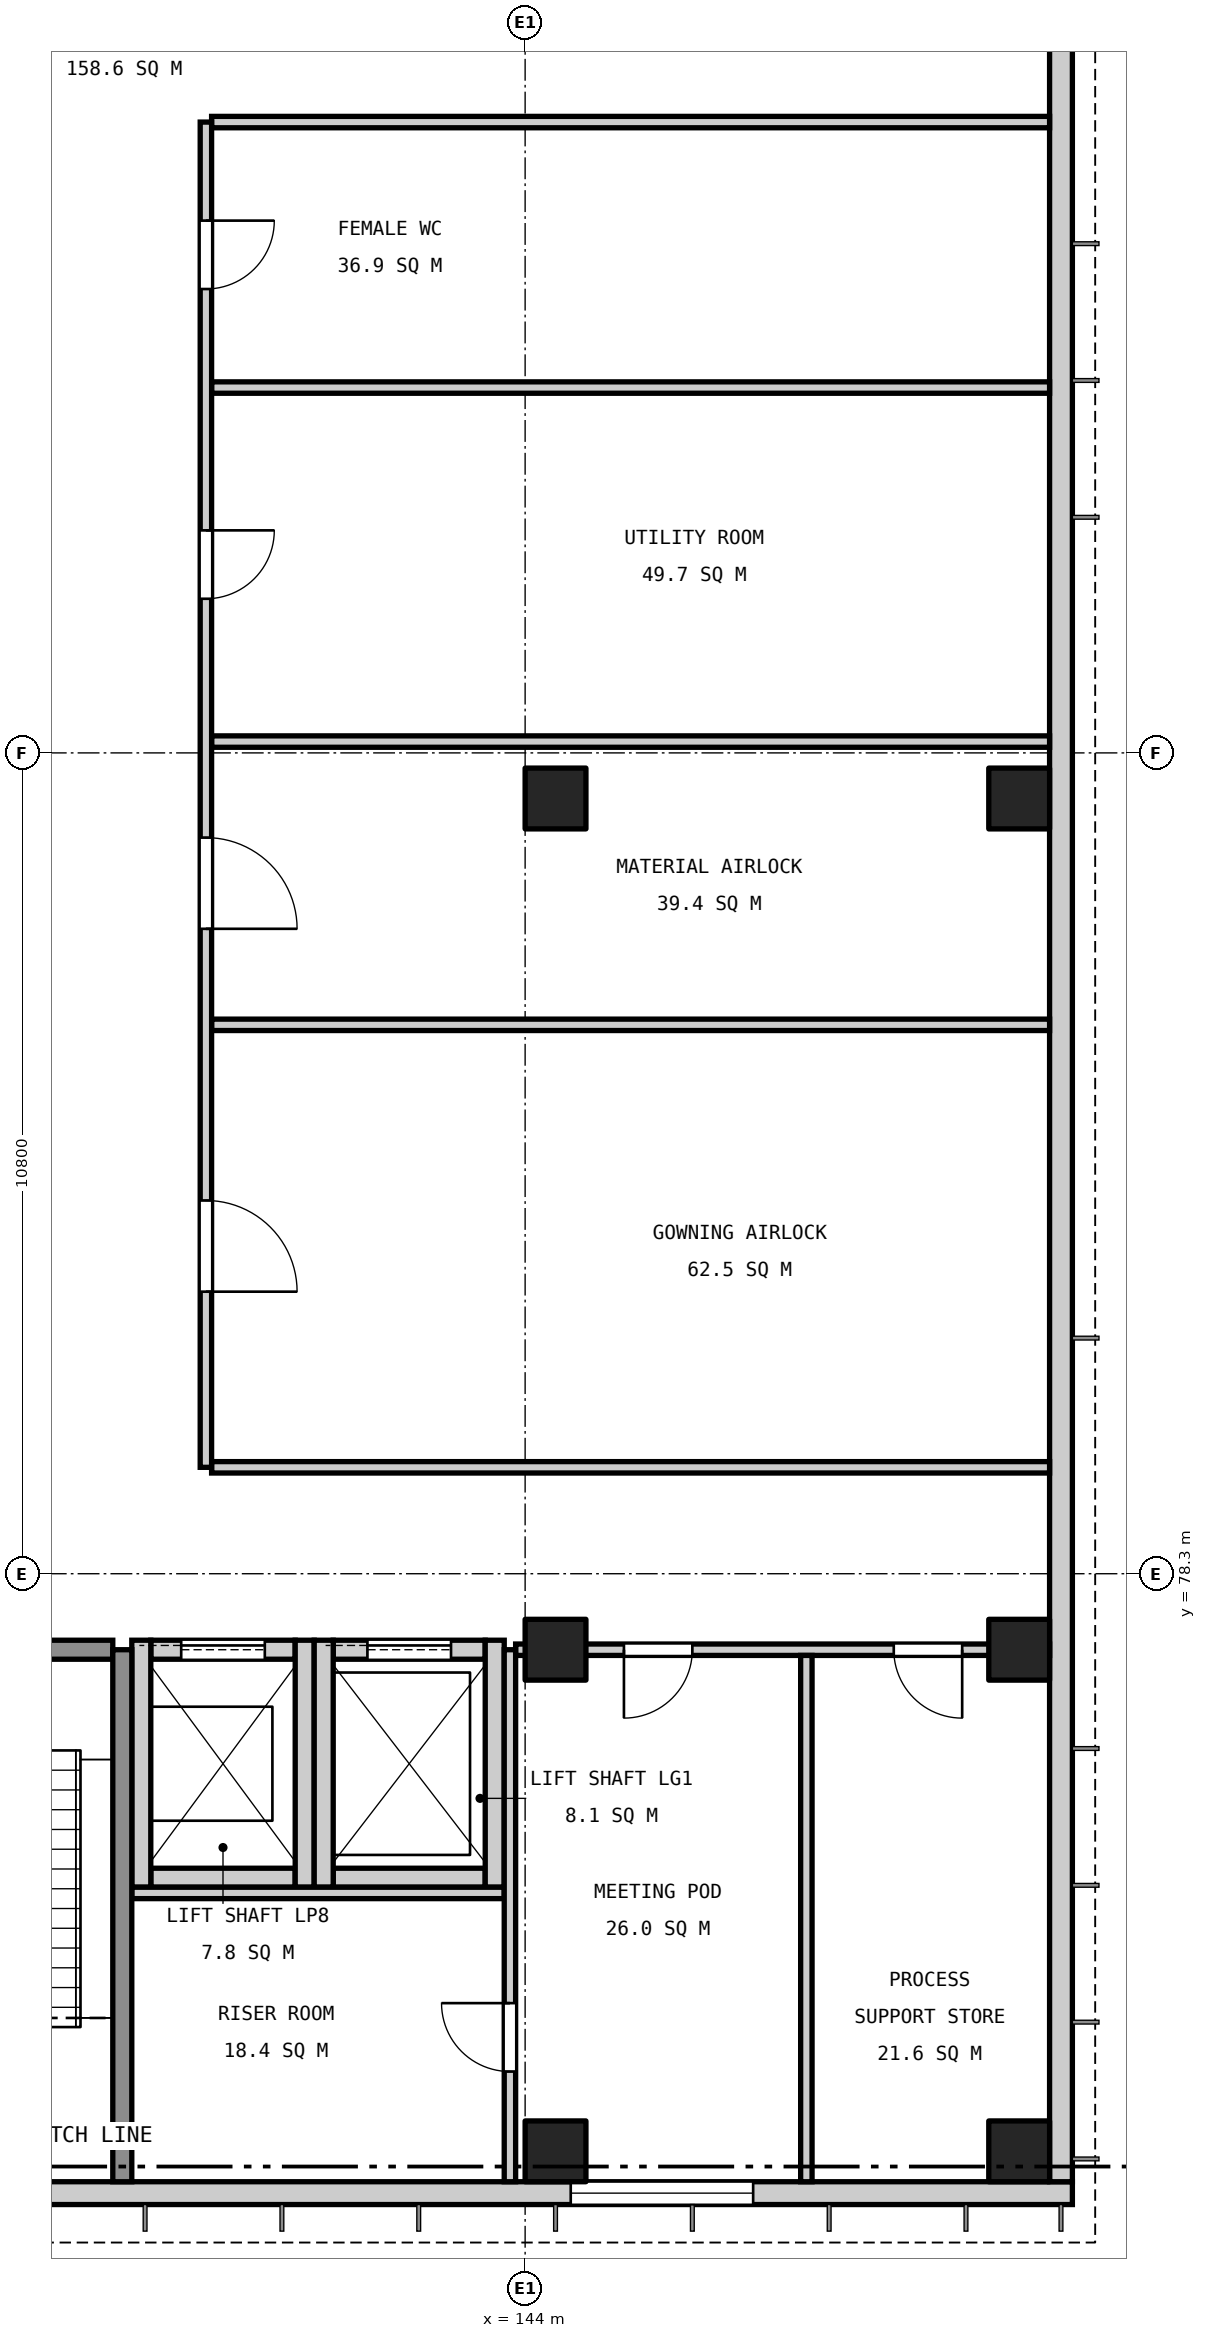
"""IFC4 building model, lengths in metres.
Left out: names, types, materials, properties, quantities, classifications, styles, units other than length and angle.
Written with IfcOpenShell. Run it as: python <this file> out.ifc"""

import sys

from ifc_helpers import new_model, si_unit, direction, frame, frame_2d, origin, origin_2d, place, context, subcontext, project, spatial, rectangle, extrude, element, fill, save


model = new_model("IFC4")
c1 = context("Model", 3, precision=1e-05, world=origin(), true_north=direction((0.0, 1.0)))
c2 = subcontext(c1, "Body", "Model", "MODEL_VIEW")
j1 = project(units=[si_unit("LENGTHUNIT", "METRE"), si_unit("PLANEANGLEUNIT", "RADIAN")], contexts=[c1])
p1 = place(None, origin())
s1 = spatial("IfcSite", under=j1, at=p1, CompositionType="ELEMENT")
p2 = place(p1, origin())
s2 = spatial("IfcBuilding", under=s1, at=p2, CompositionType="ELEMENT")
p3 = place(p2, frame((0.0, 0.0, 6.0)))
s3 = spatial("IfcBuildingStorey", under=s2, at=p3, CompositionType="ELEMENT", Elevation=6.0)
p4 = place(p3, frame((139.075, 74.3, 0.0), z_axis=(0.0, 0.0, 1.0), x_axis=(1.0, 0.0, 0.0)))
e1 = element("IfcWall", 1, at=p4, inside=s3, PredefinedType="SOLIDWALL", context=c2, shape_type="SweptSolid", body=[
    extrude(rectangle(XDim=1.9, YDim=0.25, at=frame_2d((0.95, 0.0))), origin(), (0.0, 0.0, 1.0), 4.95),
])
p5 = place(p3, frame((139.075, 77.3, 0.0), z_axis=(0.0, 0.0, 1.0), x_axis=(1.0, 0.0, 0.0)))
e2 = element("IfcWall", 2, at=p5, inside=s3, PredefinedType="SOLIDWALL", context=c2, shape_type="SweptSolid", body=[
    extrude(rectangle(XDim=1.9, YDim=0.25, at=frame_2d((0.95, 0.0))), origin(), (0.0, 0.0, 1.0), 4.95),
])
p6 = place(p5, frame((0.4, 0.0, 0.0)))
e3 = element("IfcOpeningElement", 3, at=p6, cuts=e2, PredefinedType="OPENING", context=c2, shape_type="SweptSolid", body=[
    extrude(rectangle(XDim=1.1, YDim=2.1, at=frame_2d((0.55, 1.05))), frame((0.0, 0.135, 0.0), z_axis=(0.0, -1.0, 0.0), x_axis=(1.0, 0.0, 0.0)), (0.0, 0.0, 1.0), 0.27),
])
for number, where, z_axis, x_axis in (
    (4, (138.95, 74.175, 0.0), (0.0, 0.0, 1.0), (0.0, 1.0, 0.0)),
    (5, (141.1, 74.175, 0.0), (0.0, 0.0, 1.0), (0.0, 1.0, 0.0)),
):
    element("IfcWall", number, at=place(p3, frame(where, z_axis=z_axis, x_axis=x_axis)), inside=s3, PredefinedType="SOLIDWALL", context=c2, shape_type="SweptSolid", body=[
        extrude(rectangle(XDim=3.25, YDim=0.25, at=frame_2d((1.625, 0.0))), origin(), (0.0, 0.0, 1.0), 4.95),
    ])
p7 = place(p3, frame((141.475, 74.3, 0.0), z_axis=(0.0, 0.0, 1.0), x_axis=(1.0, 0.0, 0.0)))
e6 = element("IfcWall", 6, at=p7, inside=s3, PredefinedType="SOLIDWALL", context=c2, shape_type="SweptSolid", body=[
    extrude(rectangle(XDim=2.0, YDim=0.25, at=frame_2d((1.0, 0.0))), origin(), (0.0, 0.0, 1.0), 4.95),
])
p8 = place(p3, frame((141.475, 77.3, 0.0), z_axis=(0.0, 0.0, 1.0), x_axis=(1.0, 0.0, 0.0)))
e7 = element("IfcWall", 7, at=p8, inside=s3, PredefinedType="SOLIDWALL", context=c2, shape_type="SweptSolid", body=[
    extrude(rectangle(XDim=2.0, YDim=0.25, at=frame_2d((1.0, 0.0))), origin(), (0.0, 0.0, 1.0), 4.95),
])
p9 = place(p8, frame((0.45, 0.0, 0.0)))
e8 = element("IfcOpeningElement", 8, at=p9, cuts=e7, PredefinedType="OPENING", context=c2, shape_type="SweptSolid", body=[
    extrude(rectangle(XDim=1.1, YDim=2.1, at=frame_2d((0.55, 1.05))), frame((0.0, 0.135, 0.0), z_axis=(0.0, -1.0, 0.0), x_axis=(1.0, 0.0, 0.0)), (0.0, 0.0, 1.0), 0.27),
])
for number, where, z_axis, x_axis in (
    (9, (141.35, 74.175, 0.0), (0.0, 0.0, 1.0), (0.0, 1.0, 0.0)),
    (10, (143.6, 74.175, 0.0), (0.0, 0.0, 1.0), (0.0, 1.0, 0.0)),
):
    element("IfcWall", number, at=place(p3, frame(where, z_axis=z_axis, x_axis=x_axis)), inside=s3, PredefinedType="SOLIDWALL", context=c2, shape_type="SweptSolid", body=[
        extrude(rectangle(XDim=3.25, YDim=0.25, at=frame_2d((1.625, 0.0))), origin(), (0.0, 0.0, 1.0), 4.95),
    ])
for number, where, z_axis, x_axis in (
    (11, (144.4, 70.7, 0.0), (0.0, 0.0, 1.0), (1.0, 0.0, 0.0)),
    (12, (144.4, 77.3, 0.0), (0.0, 0.0, 1.0), (1.0, 0.0, 0.0)),
    (13, (144.4, 88.5, 0.0), (0.0, 0.0, 1.0), (1.0, 0.0, 0.0)),
    (14, (150.5, 70.7, 0.0), (0.0, 0.0, 1.0), (1.0, 0.0, 0.0)),
    (15, (150.5, 77.3, 0.0), (0.0, 0.0, 1.0), (1.0, 0.0, 0.0)),
    (16, (150.5, 88.5, 0.0), (0.0, 0.0, 1.0), (1.0, 0.0, 0.0)),
):
    element("IfcColumn", number, at=place(p3, frame(where, z_axis=z_axis, x_axis=x_axis)), inside=s3, PredefinedType="COLUMN", context=c2, shape_type="SweptSolid", body=[
        extrude(rectangle(XDim=0.8, YDim=0.8, at=origin_2d()), origin(), (0.0, 0.0, 1.0), 5.4),
    ])
p10 = place(p3, frame((124.0, 70.15, 0.0), z_axis=(0.0, 0.0, 1.0), x_axis=(1.0, 0.0, 0.0)))
e17 = element("IfcWall", 17, at=p10, inside=s3, PredefinedType="SOLIDWALL", context=c2, shape_type="SweptSolid", body=[
    extrude(rectangle(XDim=27.2, YDim=0.3, at=frame_2d((13.6, 0.0))), origin(), (0.0, 0.0, 1.0), 4.95),
])
p11 = place(p10, frame((2.1, 0.0, 0.9)))
e18 = element("IfcOpeningElement", 18, at=p11, cuts=e17, PredefinedType="OPENING", context=c2, shape_type="SweptSolid", body=[
    extrude(rectangle(XDim=2.4, YDim=1.8, at=frame_2d((1.2, 0.9))), frame((0.0, 0.16, 0.0), z_axis=(0.0, -1.0, 0.0), x_axis=(1.0, 0.0, 0.0)), (0.0, 0.0, 1.0), 0.32),
])
p12 = place(p10, frame((6.9, 0.0, 0.9)))
e19 = element("IfcOpeningElement", 19, at=p12, cuts=e17, PredefinedType="OPENING", context=c2, shape_type="SweptSolid", body=[
    extrude(rectangle(XDim=2.4, YDim=1.8, at=frame_2d((1.2, 0.9))), frame((0.0, 0.16, 0.0), z_axis=(0.0, -1.0, 0.0), x_axis=(1.0, 0.0, 0.0)), (0.0, 0.0, 1.0), 0.32),
])
p13 = place(p10, frame((20.6, 0.0, 0.9)))
e20 = element("IfcOpeningElement", 20, at=p13, cuts=e17, PredefinedType="OPENING", context=c2, shape_type="SweptSolid", body=[
    extrude(rectangle(XDim=2.4, YDim=1.8, at=frame_2d((1.2, 0.9))), frame((0.0, 0.16, 0.0), z_axis=(0.0, -1.0, 0.0), x_axis=(1.0, 0.0, 0.0)), (0.0, 0.0, 1.0), 0.32),
])
p14 = place(p3, frame((151.05, 70.3, 0.0), z_axis=(0.0, 0.0, 1.0), x_axis=(0.0, 1.0, 0.0)))
e21 = element("IfcWall", 21, at=p14, inside=s3, PredefinedType="SOLIDWALL", context=c2, shape_type="SweptSolid", body=[
    extrude(rectangle(XDim=36.5, YDim=0.3, at=frame_2d((18.25, 0.0))), origin(), (0.0, 0.0, 1.0), 4.95),
])
p15 = place(p3, frame((138.825, 74.1, 0.0), z_axis=(0.0, 0.0, 1.0), x_axis=(1.0, 0.0, 0.0)))
e22 = element("IfcWall", 22, at=p15, inside=s3, PredefinedType="SOLIDWALL", context=c2, shape_type="SweptSolid", body=[
    extrude(rectangle(XDim=4.9, YDim=0.15, at=frame_2d((2.45, 0.0))), origin(), (0.0, 0.0, 1.0), 4.95),
])
p16 = place(p3, frame((124.3, 77.3, 0.0), z_axis=(0.0, 0.0, 1.0), x_axis=(1.0, 0.0, 0.0)))
e23 = element("IfcWall", 23, at=p16, inside=s3, PredefinedType="SOLIDWALL", context=c2, shape_type="SweptSolid", body=[
    extrude(rectangle(XDim=14.275, YDim=0.25, at=frame_2d((7.137, 0.0))), origin(), (0.0, 0.0, 1.0), 4.95),
])
p17 = place(p16, frame((2.4, 0.0, 0.0)))
e24 = element("IfcOpeningElement", 24, at=p17, cuts=e23, PredefinedType="OPENING", context=c2, shape_type="SweptSolid", body=[
    extrude(rectangle(XDim=1.2, YDim=2.1, at=frame_2d((0.6, 1.05))), frame((0.0, 0.135, 0.0), z_axis=(0.0, -1.0, 0.0), x_axis=(1.0, 0.0, 0.0)), (0.0, 0.0, 1.0), 0.27),
])
p18 = place(p16, frame((7.6, 0.0, 0.0)))
e25 = element("IfcOpeningElement", 25, at=p18, cuts=e23, PredefinedType="OPENING", context=c2, shape_type="SweptSolid", body=[
    extrude(rectangle(XDim=0.9, YDim=2.1, at=frame_2d((0.45, 1.05))), frame((0.0, 0.135, 0.0), z_axis=(0.0, -1.0, 0.0), x_axis=(1.0, 0.0, 0.0)), (0.0, 0.0, 1.0), 0.27),
])
p19 = place(p16, frame((11.65, 0.0, 0.0)))
e26 = element("IfcOpeningElement", 26, at=p19, cuts=e23, PredefinedType="OPENING", context=c2, shape_type="SweptSolid", body=[
    extrude(rectangle(XDim=1.2, YDim=2.1, at=frame_2d((0.6, 1.05))), frame((0.0, 0.135, 0.0), z_axis=(0.0, -1.0, 0.0), x_axis=(1.0, 0.0, 0.0)), (0.0, 0.0, 1.0), 0.27),
])
p20 = place(p3, frame((143.875, 77.3, 0.0), z_axis=(0.0, 0.0, 1.0), x_axis=(1.0, 0.0, 0.0)))
e27 = element("IfcWall", 27, at=p20, inside=s3, PredefinedType="SOLIDWALL", context=c2, shape_type="SweptSolid", body=[
    extrude(rectangle(XDim=7.025, YDim=0.15, at=frame_2d((3.512, 0.0))), origin(), (0.0, 0.0, 1.0), 4.95),
])
p21 = place(p20, frame((1.425, 0.0, 0.0)))
e28 = element("IfcOpeningElement", 28, at=p21, cuts=e27, PredefinedType="OPENING", context=c2, shape_type="SweptSolid", body=[
    extrude(rectangle(XDim=0.9, YDim=2.1, at=frame_2d((0.45, 1.05))), frame((0.0, 0.085, 0.0), z_axis=(0.0, -1.0, 0.0), x_axis=(1.0, 0.0, 0.0)), (0.0, 0.0, 1.0), 0.17),
])
p22 = place(p20, frame((4.975, 0.0, 0.0)))
e29 = element("IfcOpeningElement", 29, at=p22, cuts=e27, PredefinedType="OPENING", context=c2, shape_type="SweptSolid", body=[
    extrude(rectangle(XDim=0.9, YDim=2.1, at=frame_2d((0.45, 1.05))), frame((0.0, 0.085, 0.0), z_axis=(0.0, -1.0, 0.0), x_axis=(1.0, 0.0, 0.0)), (0.0, 0.0, 1.0), 0.17),
])
for number, where, z_axis, x_axis in (
    (30, (139.875, 79.7, 0.0), (0.0, 0.0, 1.0), (1.0, 0.0, 0.0)),
    (31, (139.875, 85.522, 0.0), (0.0, 0.0, 1.0), (1.0, 0.0, 0.0)),
    (32, (139.875, 89.249, 0.0), (0.0, 0.0, 1.0), (1.0, 0.0, 0.0)),
    (33, (139.875, 93.907, 0.0), (0.0, 0.0, 1.0), (1.0, 0.0, 0.0)),
    (34, (139.875, 97.4, 0.0), (0.0, 0.0, 1.0), (1.0, 0.0, 0.0)),
):
    element("IfcWall", number, at=place(p3, frame(where, z_axis=z_axis, x_axis=x_axis)), inside=s3, PredefinedType="SOLIDWALL", context=c2, shape_type="SweptSolid", body=[
        extrude(rectangle(XDim=11.025, YDim=0.15, at=frame_2d((5.512, 0.0))), origin(), (0.0, 0.0, 1.0), 4.95),
    ])
p23 = place(p3, frame((138.7, 70.3, 0.0), z_axis=(0.0, 0.0, 1.0), x_axis=(0.0, 1.0, 0.0)))
e35 = element("IfcWall", 35, at=p23, inside=s3, PredefinedType="SOLIDWALL", context=c2, shape_type="SweptSolid", body=[
    extrude(rectangle(XDim=7.0, YDim=0.25, at=frame_2d((3.5, 0.0))), origin(), (0.0, 0.0, 1.0), 4.95),
])
p24 = place(p3, frame((139.8, 79.7, 0.0), z_axis=(0.0, 0.0, 1.0), x_axis=(0.0, 1.0, 0.0)))
e36 = element("IfcWall", 36, at=p24, inside=s3, PredefinedType="SOLIDWALL", context=c2, shape_type="SweptSolid", body=[
    extrude(rectangle(XDim=17.7, YDim=0.15, at=frame_2d((8.85, 0.0))), origin(), (0.0, 0.0, 1.0), 4.95),
])
p25 = place(p24, frame((2.311, 0.0, 0.0)))
e37 = element("IfcOpeningElement", 37, at=p25, cuts=e36, PredefinedType="OPENING", context=c2, shape_type="SweptSolid", body=[
    extrude(rectangle(XDim=1.2, YDim=2.1, at=frame_2d((0.6, 1.05))), frame((0.0, 0.085, 0.0), z_axis=(0.0, -1.0, 0.0), x_axis=(1.0, 0.0, 0.0)), (0.0, 0.0, 1.0), 0.17),
])
p26 = place(p24, frame((7.085, 0.0, 0.0)))
e38 = element("IfcOpeningElement", 38, at=p26, cuts=e36, PredefinedType="OPENING", context=c2, shape_type="SweptSolid", body=[
    extrude(rectangle(XDim=1.2, YDim=2.1, at=frame_2d((0.6, 1.05))), frame((0.0, 0.085, 0.0), z_axis=(0.0, -1.0, 0.0), x_axis=(1.0, 0.0, 0.0)), (0.0, 0.0, 1.0), 0.17),
])
p27 = place(p24, frame((11.428, 0.0, 0.0)))
e39 = element("IfcOpeningElement", 39, at=p27, cuts=e36, PredefinedType="OPENING", context=c2, shape_type="SweptSolid", body=[
    extrude(rectangle(XDim=0.9, YDim=2.1, at=frame_2d((0.45, 1.05))), frame((0.0, 0.085, 0.0), z_axis=(0.0, -1.0, 0.0), x_axis=(1.0, 0.0, 0.0)), (0.0, 0.0, 1.0), 0.17),
])
p28 = place(p24, frame((15.503, 0.0, 0.0)))
e40 = element("IfcOpeningElement", 40, at=p28, cuts=e36, PredefinedType="OPENING", context=c2, shape_type="SweptSolid", body=[
    extrude(rectangle(XDim=0.9, YDim=2.1, at=frame_2d((0.45, 1.05))), frame((0.0, 0.085, 0.0), z_axis=(0.0, -1.0, 0.0), x_axis=(1.0, 0.0, 0.0)), (0.0, 0.0, 1.0), 0.17),
])
p29 = place(p3, frame((143.8, 70.3, 0.0), z_axis=(0.0, 0.0, 1.0), x_axis=(0.0, 1.0, 0.0)))
e41 = element("IfcWall", 41, at=p29, inside=s3, PredefinedType="SOLIDWALL", context=c2, shape_type="SweptSolid", body=[
    extrude(rectangle(XDim=7.0, YDim=0.15, at=frame_2d((3.5, 0.0))), origin(), (0.0, 0.0, 1.0), 4.95),
])
p30 = place(p29, frame((1.45, 0.0, 0.0)))
e42 = element("IfcOpeningElement", 42, at=p30, cuts=e41, PredefinedType="OPENING", context=c2, shape_type="SweptSolid", body=[
    extrude(rectangle(XDim=0.9, YDim=2.1, at=frame_2d((0.45, 1.05))), frame((0.0, 0.085, 0.0), z_axis=(0.0, -1.0, 0.0), x_axis=(1.0, 0.0, 0.0)), (0.0, 0.0, 1.0), 0.17),
])
p31 = place(p3, frame((147.7, 70.3, 0.0), z_axis=(0.0, 0.0, 1.0), x_axis=(0.0, 1.0, 0.0)))
e43 = element("IfcWall", 43, at=p31, inside=s3, PredefinedType="SOLIDWALL", context=c2, shape_type="SweptSolid", body=[
    extrude(rectangle(XDim=6.925, YDim=0.15, at=frame_2d((3.462, 0.0))), origin(), (0.0, 0.0, 1.0), 4.95),
])
p32 = place(p21, frame((0.9, 0.0, 0.0), z_axis=(0.0, 0.0, 1.0), x_axis=(-1.0, 0.0, 0.0)))
e44 = element("IfcDoor", 44, at=p32, inside=s3, OperationType="SINGLE_SWING_RIGHT", PredefinedType="DOOR", context=c2, shape_type="SweptSolid", body=[
    extrude(rectangle(XDim=0.9, YDim=2.1, at=frame_2d((0.45, 1.05))), frame((0.0, 0.025, 0.0), z_axis=(0.0, -1.0, 0.0), x_axis=(1.0, 0.0, 0.0)), (0.0, 0.0, 1.0), 0.05),
])
fill(e28, e44)
p33 = place(p22, frame((0.9, 0.0, 0.0), z_axis=(0.0, 0.0, 1.0), x_axis=(-1.0, 0.0, 0.0)))
e45 = element("IfcDoor", 45, at=p33, inside=s3, OperationType="SINGLE_SWING_LEFT", PredefinedType="DOOR", context=c2, shape_type="SweptSolid", body=[
    extrude(rectangle(XDim=0.9, YDim=2.1, at=frame_2d((0.45, 1.05))), frame((0.0, 0.025, 0.0), z_axis=(0.0, -1.0, 0.0), x_axis=(1.0, 0.0, 0.0)), (0.0, 0.0, 1.0), 0.05),
])
fill(e29, e45)
p34 = place(p25, frame((1.2, 0.0, 0.0), z_axis=(0.0, 0.0, 1.0), x_axis=(-1.0, 0.0, 0.0)))
e46 = element("IfcDoor", 46, at=p34, inside=s3, OperationType="SINGLE_SWING_RIGHT", PredefinedType="DOOR", context=c2, shape_type="SweptSolid", body=[
    extrude(rectangle(XDim=1.2, YDim=2.1, at=frame_2d((0.6, 1.05))), frame((0.0, 0.025, 0.0), z_axis=(0.0, -1.0, 0.0), x_axis=(1.0, 0.0, 0.0)), (0.0, 0.0, 1.0), 0.05),
])
fill(e37, e46)
p35 = place(p26, frame((1.2, 0.0, 0.0), z_axis=(0.0, 0.0, 1.0), x_axis=(-1.0, 0.0, 0.0)))
e47 = element("IfcDoor", 47, at=p35, inside=s3, OperationType="SINGLE_SWING_RIGHT", PredefinedType="DOOR", context=c2, shape_type="SweptSolid", body=[
    extrude(rectangle(XDim=1.2, YDim=2.1, at=frame_2d((0.6, 1.05))), frame((0.0, 0.025, 0.0), z_axis=(0.0, -1.0, 0.0), x_axis=(1.0, 0.0, 0.0)), (0.0, 0.0, 1.0), 0.05),
])
fill(e38, e47)
p36 = place(p27, frame((0.9, 0.0, 0.0), z_axis=(0.0, 0.0, 1.0), x_axis=(-1.0, 0.0, 0.0)))
e48 = element("IfcDoor", 48, at=p36, inside=s3, OperationType="SINGLE_SWING_LEFT", PredefinedType="DOOR", context=c2, shape_type="SweptSolid", body=[
    extrude(rectangle(XDim=0.9, YDim=2.1, at=frame_2d((0.45, 1.05))), frame((0.0, 0.025, 0.0), z_axis=(0.0, -1.0, 0.0), x_axis=(1.0, 0.0, 0.0)), (0.0, 0.0, 1.0), 0.05),
])
fill(e39, e48)
p37 = place(p28, frame((0.9, 0.0, 0.0), z_axis=(0.0, 0.0, 1.0), x_axis=(-1.0, 0.0, 0.0)))
e49 = element("IfcDoor", 49, at=p37, inside=s3, OperationType="SINGLE_SWING_LEFT", PredefinedType="DOOR", context=c2, shape_type="SweptSolid", body=[
    extrude(rectangle(XDim=0.9, YDim=2.1, at=frame_2d((0.45, 1.05))), frame((0.0, 0.025, 0.0), z_axis=(0.0, -1.0, 0.0), x_axis=(1.0, 0.0, 0.0)), (0.0, 0.0, 1.0), 0.05),
])
fill(e40, e49)
p38 = place(p30, origin())
e50 = element("IfcDoor", 50, at=p38, inside=s3, OperationType="SINGLE_SWING_RIGHT", PredefinedType="DOOR", context=c2, shape_type="SweptSolid", body=[
    extrude(rectangle(XDim=0.9, YDim=2.1, at=frame_2d((0.45, 1.05))), frame((0.0, 0.025, 0.0), z_axis=(0.0, -1.0, 0.0), x_axis=(1.0, 0.0, 0.0)), (0.0, 0.0, 1.0), 0.05),
])
fill(e42, e50)
p39 = place(p6, origin())
e51 = element("IfcDoor", 51, at=p39, inside=s3, OperationType="SLIDING_TO_LEFT", PredefinedType="DOOR", context=c2, shape_type="SweptSolid", body=[
    extrude(rectangle(XDim=1.1, YDim=2.1, at=frame_2d((0.55, 1.05))), frame((0.0, 0.025, 0.0), z_axis=(0.0, -1.0, 0.0), x_axis=(1.0, 0.0, 0.0)), (0.0, 0.0, 1.0), 0.05),
])
fill(e3, e51)
p40 = place(p9, origin())
e52 = element("IfcDoor", 52, at=p40, inside=s3, OperationType="SLIDING_TO_LEFT", PredefinedType="DOOR", context=c2, shape_type="SweptSolid", body=[
    extrude(rectangle(XDim=1.1, YDim=2.1, at=frame_2d((0.55, 1.05))), frame((0.0, 0.025, 0.0), z_axis=(0.0, -1.0, 0.0), x_axis=(1.0, 0.0, 0.0)), (0.0, 0.0, 1.0), 0.05),
])
fill(e8, e52)
p41 = place(p13, origin())
e53 = element("IfcWindow", 53, at=p41, inside=s3, PartitioningType="SINGLE_PANEL", PredefinedType="WINDOW", context=c2, shape_type="SweptSolid", body=[
    extrude(rectangle(XDim=2.4, YDim=1.8, at=frame_2d((1.2, 0.9))), frame((0.0, 0.03, 0.0), z_axis=(0.0, -1.0, 0.0), x_axis=(1.0, 0.0, 0.0)), (0.0, 0.0, 1.0), 0.06),
])
fill(e20, e53)
save(model, sys.argv[1])
